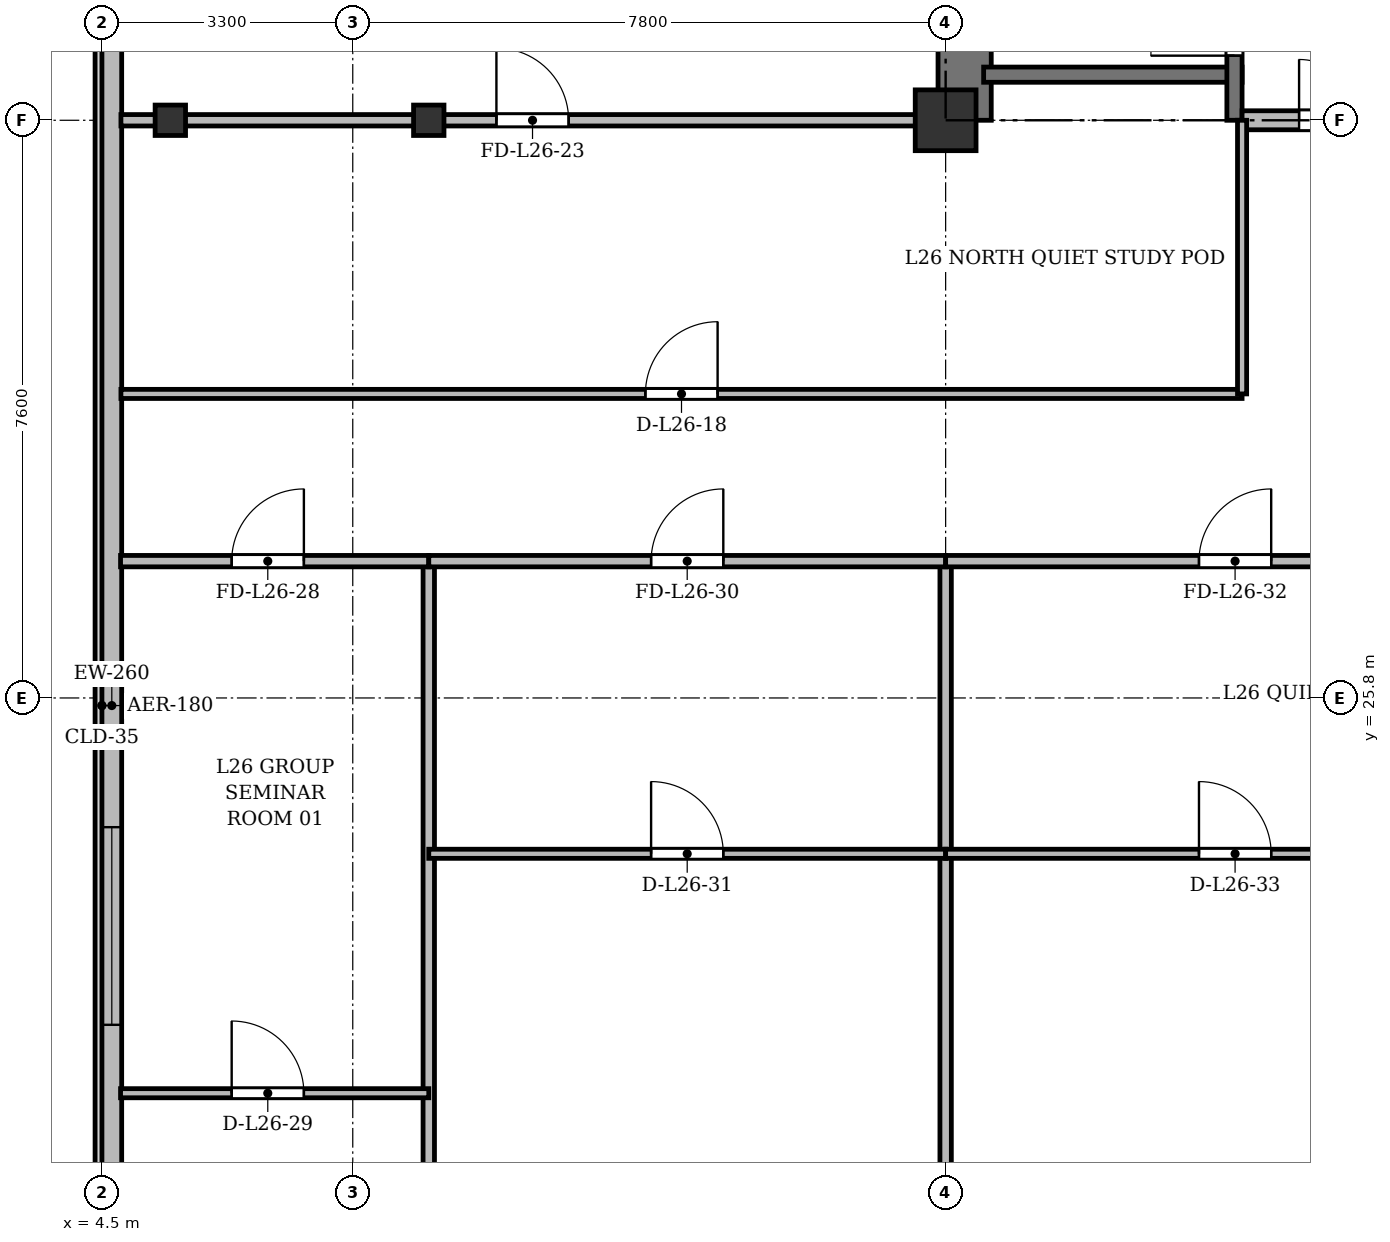
"""IFC4 building model, lengths in metres.
Left out: names, types, materials, properties, quantities, classifications, styles, units other than length and angle.
Written with IfcOpenShell. Run it as: python <this file> out.ifc"""

import sys

from ifc_helpers import new_model, si_unit, direction, frame, frame_2d, origin, origin_2d, place, context, subcontext, project, spatial, rectangle, i_section, extrude, source, transform, mapped, element, fill, save


model = new_model("IFC4")
c1 = context("Model", 3, precision=1e-05, world=origin(), true_north=direction((0.0, 1.0)))
c2 = subcontext(c1, "Body", "Model", "MODEL_VIEW")
j1 = project(units=[si_unit("LENGTHUNIT", "METRE"), si_unit("PLANEANGLEUNIT", "RADIAN")], contexts=[c1])
p1 = place(None, origin())
s1 = spatial("IfcSite", under=j1, at=p1, CompositionType="ELEMENT")
p2 = place(p1, origin())
s2 = spatial("IfcBuilding", under=s1, at=p2, CompositionType="ELEMENT")
p3 = place(p2, frame((0.0, 0.0, 103.3)))
s3 = spatial("IfcBuildingStorey", under=s2, at=p3, CompositionType="ELEMENT", Elevation=103.3)
m1 = source(origin(), c2, "Body", "SweptSolid", [
    extrude(i_section(OverallWidth=0.4, OverallDepth=0.4, WebThickness=0.022, FlangeThickness=0.035, at=origin_2d()), origin(), (0.0, 0.0, 1.0), 3.6),
])
for number, where, z_axis, x_axis in (
    (1, (5.4, 33.4, 0.0), (0.0, 0.0, 1.0), (1.0, 0.0, 0.0)),
    (2, (8.8, 33.4, 0.0), (0.0, 0.0, 1.0), (1.0, 0.0, 0.0)),
):
    element("IfcColumn", number, at=place(p3, frame(where, z_axis=z_axis, x_axis=x_axis)), inside=s3, PredefinedType="COLUMN", context=c2, shape_type="MappedRepresentation", body=[
        mapped(m1, transform((0.0, 0.0, 0.0), x_axis=(1.0, 0.0, 0.0), y_axis=(0.0, 1.0, 0.0), z_axis=(0.0, 0.0, 1.0), scale=1.0)),
    ])
m2 = source(origin(), c2, "Body", "SweptSolid", [
    extrude(rectangle(XDim=0.8, YDim=0.8, at=origin_2d()), origin(), (0.0, 0.0, 1.0), 3.6),
])
p4 = place(p3, frame((15.6, 33.4, 0.0), z_axis=(0.0, 0.0, 1.0), x_axis=(1.0, 0.0, 0.0)))
e3 = element("IfcColumn", 3, at=p4, inside=s3, PredefinedType="COLUMN", context=c2, shape_type="MappedRepresentation", body=[
    mapped(m2, transform((0.0, 0.0, 0.0), x_axis=(1.0, 0.0, 0.0), y_axis=(0.0, 1.0, 0.0), z_axis=(0.0, 0.0, 1.0), scale=1.0)),
])
p5 = place(p3, frame((4.63, 5.9, 0.0), z_axis=(0.0, 0.0, 1.0), x_axis=(0.0, 1.0, 0.0)))
e4 = element("IfcWall", 4, at=p5, inside=s3, PredefinedType="SOLIDWALL", context=c2, shape_type="SweptSolid", body=[
    extrude(rectangle(XDim=39.6, YDim=0.26, at=frame_2d((19.8, 0.0))), origin(), (0.0, 0.0, 1.0), 3.34),
])
p6 = place(p5, frame((1.45, 0.0, 0.92)))
e5 = element("IfcOpeningElement", 5, at=p6, cuts=e4, PredefinedType="OPENING", context=c2, shape_type="SweptSolid", body=[
    extrude(rectangle(XDim=1.2, YDim=1.65, at=frame_2d((0.6, 0.825))), frame((0.0, 0.14, 0.0), z_axis=(0.0, -1.0, 0.0), x_axis=(1.0, 0.0, 0.0)), (0.0, 0.0, 1.0), 0.28),
])
p7 = place(p5, frame((4.2, 0.0, 0.92)))
e6 = element("IfcOpeningElement", 6, at=p7, cuts=e4, PredefinedType="OPENING", context=c2, shape_type="SweptSolid", body=[
    extrude(rectangle(XDim=2.6, YDim=1.9, at=frame_2d((1.3, 0.95))), frame((0.0, 0.14, 0.0), z_axis=(0.0, -1.0, 0.0), x_axis=(1.0, 0.0, 0.0)), (0.0, 0.0, 1.0), 0.28),
])
p8 = place(p5, frame((8.4, 0.0, 0.92)))
e7 = element("IfcOpeningElement", 7, at=p8, cuts=e4, PredefinedType="OPENING", context=c2, shape_type="SweptSolid", body=[
    extrude(rectangle(XDim=2.6, YDim=1.9, at=frame_2d((1.3, 0.95))), frame((0.0, 0.14, 0.0), z_axis=(0.0, -1.0, 0.0), x_axis=(1.0, 0.0, 0.0)), (0.0, 0.0, 1.0), 0.28),
])
p9 = place(p5, frame((15.6, 0.0, 0.92)))
e8 = element("IfcOpeningElement", 8, at=p9, cuts=e4, PredefinedType="OPENING", context=c2, shape_type="SweptSolid", body=[
    extrude(rectangle(XDim=2.6, YDim=1.9, at=frame_2d((1.3, 0.95))), frame((0.0, 0.14, 0.0), z_axis=(0.0, -1.0, 0.0), x_axis=(1.0, 0.0, 0.0)), (0.0, 0.0, 1.0), 0.28),
])
p10 = place(p5, frame((29.6, 0.0, 0.92)))
e9 = element("IfcOpeningElement", 9, at=p10, cuts=e4, PredefinedType="OPENING", context=c2, shape_type="SweptSolid", body=[
    extrude(rectangle(XDim=2.6, YDim=1.9, at=frame_2d((1.3, 0.95))), frame((0.0, 0.14, 0.0), z_axis=(0.0, -1.0, 0.0), x_axis=(1.0, 0.0, 0.0)), (0.0, 0.0, 1.0), 0.28),
])
p11 = place(p5, frame((33.9, 0.0, 0.92)))
e10 = element("IfcOpeningElement", 10, at=p11, cuts=e4, PredefinedType="OPENING", context=c2, shape_type="SweptSolid", body=[
    extrude(rectangle(XDim=1.2, YDim=1.65, at=frame_2d((0.6, 0.825))), frame((0.0, 0.14, 0.0), z_axis=(0.0, -1.0, 0.0), x_axis=(1.0, 0.0, 0.0)), (0.0, 0.0, 1.0), 0.28),
])
p12 = place(p5, frame((37.25, 0.0, 0.92)))
e11 = element("IfcOpeningElement", 11, at=p12, cuts=e4, PredefinedType="OPENING", context=c2, shape_type="SweptSolid", body=[
    extrude(rectangle(XDim=1.2, YDim=1.65, at=frame_2d((0.6, 0.825))), frame((0.0, 0.14, 0.0), z_axis=(0.0, -1.0, 0.0), x_axis=(1.0, 0.0, 0.0)), (0.0, 0.0, 1.0), 0.28),
])
p13 = place(p3, frame((15.85, 33.4, 0.0), z_axis=(0.0, 0.0, 1.0), x_axis=(0.0, 1.0, 0.0)))
e12 = element("IfcWall", 12, at=p13, inside=s3, PredefinedType="SHEAR", context=c2, shape_type="SweptSolid", body=[
    extrude(rectangle(XDim=11.7, YDim=0.7, at=frame_2d((5.85, 0.0))), origin(), (0.0, 0.0, 1.0), 3.34),
])
p14 = place(p3, frame((16.1, 34.0, 0.0), z_axis=(0.0, 0.0, 1.0), x_axis=(1.0, 0.0, 0.0)))
e13 = element("IfcWall", 13, at=p14, inside=s3, PredefinedType="SHEAR", context=c2, shape_type="SweptSolid", body=[
    extrude(rectangle(XDim=3.4, YDim=0.2, at=frame_2d((1.7, 0.0))), origin(), (0.0, 0.0, 1.0), 3.34),
])
p15 = place(p3, frame((19.4, 33.4, 0.0), z_axis=(0.0, 0.0, 1.0), x_axis=(0.0, 1.0, 0.0)))
e14 = element("IfcWall", 14, at=p15, inside=s3, PredefinedType="SHEAR", context=c2, shape_type="SweptSolid", body=[
    extrude(rectangle(XDim=11.1, YDim=0.2, at=frame_2d((5.55, 0.0))), origin(), (0.0, 0.0, 1.0), 3.34),
])
p16 = place(p15, frame((0.85, 0.0, 0.0)))
e15 = element("IfcOpeningElement", 15, at=p16, cuts=e14, PredefinedType="OPENING", context=c2, shape_type="SweptSolid", body=[
    extrude(rectangle(XDim=1.1, YDim=2.15, at=frame_2d((0.55, 1.075))), frame((0.0, 0.11, 0.0), z_axis=(0.0, -1.0, 0.0), x_axis=(1.0, 0.0, 0.0)), (0.0, 0.0, 1.0), 0.22),
])
p17 = place(p3, frame((19.5, 33.4, 0.0), z_axis=(0.0, 0.0, 1.0), x_axis=(1.0, 0.0, 0.0)))
e16 = element("IfcWall", 16, at=p17, inside=s3, PredefinedType="PARTITIONING", context=c2, shape_type="SweptSolid", body=[
    extrude(rectangle(XDim=6.8, YDim=0.25, at=frame_2d((3.4, 0.0))), origin(), (0.0, 0.0, 1.0), 2.752),
])
p18 = place(p17, frame((0.75, 0.0, 0.0)))
e17 = element("IfcOpeningElement", 17, at=p18, cuts=e16, PredefinedType="OPENING", context=c2, shape_type="SweptSolid", body=[
    extrude(rectangle(XDim=1.6, YDim=2.2, at=frame_2d((0.8, 1.1))), frame((0.0, 0.135, 0.0), z_axis=(0.0, -1.0, 0.0), x_axis=(1.0, 0.0, 0.0)), (0.0, 0.0, 1.0), 0.27),
])
p19 = place(p3, frame((4.75, 29.8, 0.0), z_axis=(0.0, 0.0, 1.0), x_axis=(1.0, 0.0, 0.0)))
e18 = element("IfcWall", 18, at=p19, inside=s3, PredefinedType="PARTITIONING", context=c2, shape_type="SweptSolid", body=[
    extrude(rectangle(XDim=14.75, YDim=0.12, at=frame_2d((7.375, 0.0))), origin(), (0.0, 0.0, 1.0), 2.84),
])
p20 = place(p19, frame((6.9, 0.0, 0.0)))
e19 = element("IfcOpeningElement", 19, at=p20, cuts=e18, PredefinedType="OPENING", context=c2, shape_type="SweptSolid", body=[
    extrude(rectangle(XDim=0.95, YDim=2.15, at=frame_2d((0.475, 1.075))), frame((0.0, 0.07, 0.0), z_axis=(0.0, -1.0, 0.0), x_axis=(1.0, 0.0, 0.0)), (0.0, 0.0, 1.0), 0.14),
])
p21 = place(p3, frame((19.5, 29.8, 0.0), z_axis=(0.0, 0.0, 1.0), x_axis=(0.0, 1.0, 0.0)))
e20 = element("IfcWall", 20, at=p21, inside=s3, PredefinedType="PARTITIONING", context=c2, shape_type="SweptSolid", body=[
    extrude(rectangle(XDim=3.6, YDim=0.12, at=frame_2d((1.8, 0.0))), origin(), (0.0, 0.0, 1.0), 2.752),
])
p22 = place(p3, frame((4.75, 33.4, 0.0), z_axis=(0.0, 0.0, 1.0), x_axis=(1.0, 0.0, 0.0)))
e21 = element("IfcWall", 21, at=p22, inside=s3, PredefinedType="PARTITIONING", context=c2, shape_type="SweptSolid", body=[
    extrude(rectangle(XDim=10.85, YDim=0.15, at=frame_2d((5.425, 0.0))), origin(), (0.0, 0.0, 1.0), 2.752),
])
p23 = place(p22, frame((4.94, 0.0, 0.0)))
e22 = element("IfcOpeningElement", 22, at=p23, cuts=e21, PredefinedType="OPENING", context=c2, shape_type="SweptSolid", body=[
    extrude(rectangle(XDim=0.95, YDim=2.15, at=frame_2d((0.475, 1.075))), frame((0.0, 0.085, 0.0), z_axis=(0.0, -1.0, 0.0), x_axis=(1.0, 0.0, 0.0)), (0.0, 0.0, 1.0), 0.17),
])
for number, where, z_axis, x_axis in (
    (23, (8.8, 3.145, 0.0), (0.0, 0.0, 1.0), (0.0, 1.0, 0.0)),
    (24, (15.6, 3.145, 0.0), (0.0, 0.0, 1.0), (0.0, 1.0, 0.0)),
):
    element("IfcWall", number, at=place(p3, frame(where, z_axis=z_axis, x_axis=x_axis)), inside=s3, PredefinedType="PARTITIONING", context=c2, shape_type="SweptSolid", body=[
        extrude(rectangle(XDim=24.455, YDim=0.15, at=frame_2d((12.228, 0.0))), origin(), (0.0, 0.0, 1.0), 2.84),
    ])
p24 = place(p3, frame((4.745, 27.6, 0.0), z_axis=(0.0, 0.0, 1.0), x_axis=(1.0, 0.0, 0.0)))
e25 = element("IfcWall", 25, at=p24, inside=s3, PredefinedType="PARTITIONING", context=c2, shape_type="SweptSolid", body=[
    extrude(rectangle(XDim=4.055, YDim=0.15, at=frame_2d((2.027, 0.0))), origin(), (0.0, 0.0, 1.0), 2.84),
])
p25 = place(p24, frame((1.462, 0.0, 0.0)))
e26 = element("IfcOpeningElement", 26, at=p25, cuts=e25, PredefinedType="OPENING", context=c2, shape_type="SweptSolid", body=[
    extrude(rectangle(XDim=0.95, YDim=2.15, at=frame_2d((0.475, 1.075))), frame((0.0, 0.085, 0.0), z_axis=(0.0, -1.0, 0.0), x_axis=(1.0, 0.0, 0.0)), (0.0, 0.0, 1.0), 0.17),
])
p26 = place(p3, frame((4.745, 20.6, 0.0), z_axis=(0.0, 0.0, 1.0), x_axis=(1.0, 0.0, 0.0)))
e27 = element("IfcWall", 27, at=p26, inside=s3, PredefinedType="PARTITIONING", context=c2, shape_type="SweptSolid", body=[
    extrude(rectangle(XDim=4.055, YDim=0.12, at=frame_2d((2.027, 0.0))), origin(), (0.0, 0.0, 1.0), 2.84),
])
p27 = place(p26, frame((1.462, 0.0, 0.0)))
e28 = element("IfcOpeningElement", 28, at=p27, cuts=e27, PredefinedType="OPENING", context=c2, shape_type="SweptSolid", body=[
    extrude(rectangle(XDim=0.95, YDim=2.15, at=frame_2d((0.475, 1.075))), frame((0.0, 0.07, 0.0), z_axis=(0.0, -1.0, 0.0), x_axis=(1.0, 0.0, 0.0)), (0.0, 0.0, 1.0), 0.14),
])
p28 = place(p3, frame((8.8, 27.6, 0.0), z_axis=(0.0, 0.0, 1.0), x_axis=(1.0, 0.0, 0.0)))
e29 = element("IfcWall", 29, at=p28, inside=s3, PredefinedType="PARTITIONING", context=c2, shape_type="SweptSolid", body=[
    extrude(rectangle(XDim=6.8, YDim=0.15, at=frame_2d((3.4, 0.0))), origin(), (0.0, 0.0, 1.0), 2.84),
])
p29 = place(p28, frame((2.925, 0.0, 0.0)))
e30 = element("IfcOpeningElement", 30, at=p29, cuts=e29, PredefinedType="OPENING", context=c2, shape_type="SweptSolid", body=[
    extrude(rectangle(XDim=0.95, YDim=2.15, at=frame_2d((0.475, 1.075))), frame((0.0, 0.085, 0.0), z_axis=(0.0, -1.0, 0.0), x_axis=(1.0, 0.0, 0.0)), (0.0, 0.0, 1.0), 0.17),
])
p30 = place(p3, frame((8.8, 23.75, 0.0), z_axis=(0.0, 0.0, 1.0), x_axis=(1.0, 0.0, 0.0)))
e31 = element("IfcWall", 31, at=p30, inside=s3, PredefinedType="PARTITIONING", context=c2, shape_type="SweptSolid", body=[
    extrude(rectangle(XDim=6.8, YDim=0.12, at=frame_2d((3.4, 0.0))), origin(), (0.0, 0.0, 1.0), 2.84),
])
p31 = place(p30, frame((2.925, 0.0, 0.0)))
e32 = element("IfcOpeningElement", 32, at=p31, cuts=e31, PredefinedType="OPENING", context=c2, shape_type="SweptSolid", body=[
    extrude(rectangle(XDim=0.95, YDim=2.15, at=frame_2d((0.475, 1.075))), frame((0.0, 0.07, 0.0), z_axis=(0.0, -1.0, 0.0), x_axis=(1.0, 0.0, 0.0)), (0.0, 0.0, 1.0), 0.14),
])
p32 = place(p3, frame((15.6, 27.6, 0.0), z_axis=(0.0, 0.0, 1.0), x_axis=(1.0, 0.0, 0.0)))
e33 = element("IfcWall", 33, at=p32, inside=s3, PredefinedType="PARTITIONING", context=c2, shape_type="SweptSolid", body=[
    extrude(rectangle(XDim=7.8, YDim=0.15, at=frame_2d((3.9, 0.0))), origin(), (0.0, 0.0, 1.0), 2.84),
])
p33 = place(p32, frame((3.333, 0.0, 0.0)))
e34 = element("IfcOpeningElement", 34, at=p33, cuts=e33, PredefinedType="OPENING", context=c2, shape_type="SweptSolid", body=[
    extrude(rectangle(XDim=0.95, YDim=2.15, at=frame_2d((0.475, 1.075))), frame((0.0, 0.085, 0.0), z_axis=(0.0, -1.0, 0.0), x_axis=(1.0, 0.0, 0.0)), (0.0, 0.0, 1.0), 0.17),
])
p34 = place(p3, frame((15.6, 23.75, 0.0), z_axis=(0.0, 0.0, 1.0), x_axis=(1.0, 0.0, 0.0)))
e35 = element("IfcWall", 35, at=p34, inside=s3, PredefinedType="PARTITIONING", context=c2, shape_type="SweptSolid", body=[
    extrude(rectangle(XDim=7.8, YDim=0.12, at=frame_2d((3.9, 0.0))), origin(), (0.0, 0.0, 1.0), 2.84),
])
p35 = place(p34, frame((3.333, 0.0, 0.0)))
e36 = element("IfcOpeningElement", 36, at=p35, cuts=e35, PredefinedType="OPENING", context=c2, shape_type="SweptSolid", body=[
    extrude(rectangle(XDim=0.95, YDim=2.15, at=frame_2d((0.475, 1.075))), frame((0.0, 0.07, 0.0), z_axis=(0.0, -1.0, 0.0), x_axis=(1.0, 0.0, 0.0)), (0.0, 0.0, 1.0), 0.14),
])
m3 = source(origin(), c2, "Body", "SweptSolid", [
    extrude(rectangle(XDim=2.6, YDim=1.9, at=frame_2d((1.3, 0.95))), frame((0.0, 0.03, 0.0), z_axis=(0.0, -1.0, 0.0), x_axis=(1.0, 0.0, 0.0)), (0.0, 0.0, 1.0), 0.06),
])
p36 = place(p9, origin())
e37 = element("IfcWindow", 37, at=p36, inside=s3, PartitioningType="SINGLE_PANEL", PredefinedType="WINDOW", context=c2, shape_type="MappedRepresentation", body=[
    mapped(m3, transform((0.0, 0.0, 0.0), x_axis=(1.0, 0.0, 0.0), y_axis=(0.0, 1.0, 0.0), z_axis=(0.0, 0.0, 1.0), scale=1.0)),
])
fill(e8, e37)
m4 = source(origin(), c2, "Body", "SweptSolid", [
    extrude(rectangle(XDim=1.1, YDim=2.15, at=frame_2d((0.55, 1.075))), frame((0.0, 0.025, 0.0), z_axis=(0.0, -1.0, 0.0), x_axis=(1.0, 0.0, 0.0)), (0.0, 0.0, 1.0), 0.05),
])
p37 = place(p16, origin())
e38 = element("IfcDoor", 38, at=p37, inside=s3, OperationType="SINGLE_SWING_LEFT", PredefinedType="DOOR", context=c2, shape_type="MappedRepresentation", body=[
    mapped(m4, transform((0.0, 0.0, 0.0), x_axis=(1.0, 0.0, 0.0), y_axis=(0.0, 1.0, 0.0), z_axis=(0.0, 0.0, 1.0), scale=1.0)),
])
fill(e15, e38)
m5 = source(origin(), c2, "Body", "SweptSolid", [
    extrude(rectangle(XDim=1.6, YDim=2.2, at=frame_2d((0.8, 1.1))), frame((0.0, 0.025, 0.0), z_axis=(0.0, -1.0, 0.0), x_axis=(1.0, 0.0, 0.0)), (0.0, 0.0, 1.0), 0.05),
])
p38 = place(p18, origin())
e39 = element("IfcDoor", 39, at=p38, inside=s3, OperationType="DOUBLE_DOOR_SINGLE_SWING", PredefinedType="DOOR", context=c2, shape_type="MappedRepresentation", body=[
    mapped(m5, transform((0.0, 0.0, 0.0), x_axis=(1.0, 0.0, 0.0), y_axis=(0.0, 1.0, 0.0), z_axis=(0.0, 0.0, 1.0), scale=1.0)),
])
fill(e17, e39)
m6 = source(origin(), c2, "Body", "SweptSolid", [
    extrude(rectangle(XDim=0.95, YDim=2.15, at=frame_2d((0.475, 1.075))), frame((0.0, 0.025, 0.0), z_axis=(0.0, -1.0, 0.0), x_axis=(1.0, 0.0, 0.0)), (0.0, 0.0, 1.0), 0.05),
])
p39 = place(p20, origin())
e40 = element("IfcDoor", 40, at=p39, inside=s3, OperationType="SINGLE_SWING_RIGHT", PredefinedType="DOOR", context=c2, shape_type="MappedRepresentation", body=[
    mapped(m6, transform((0.0, 0.0, 0.0), x_axis=(1.0, 0.0, 0.0), y_axis=(0.0, 1.0, 0.0), z_axis=(0.0, 0.0, 1.0), scale=1.0)),
])
fill(e19, e40)
p40 = place(p23, origin())
e41 = element("IfcDoor", 41, at=p40, inside=s3, OperationType="SINGLE_SWING_LEFT", PredefinedType="DOOR", context=c2, shape_type="MappedRepresentation", body=[
    mapped(m6, transform((0.0, 0.0, 0.0), x_axis=(1.0, 0.0, 0.0), y_axis=(0.0, 1.0, 0.0), z_axis=(0.0, 0.0, 1.0), scale=1.0)),
])
fill(e22, e41)
p41 = place(p25, origin())
e42 = element("IfcDoor", 42, at=p41, inside=s3, OperationType="SINGLE_SWING_RIGHT", PredefinedType="DOOR", context=c2, shape_type="MappedRepresentation", body=[
    mapped(m6, transform((0.0, 0.0, 0.0), x_axis=(1.0, 0.0, 0.0), y_axis=(0.0, 1.0, 0.0), z_axis=(0.0, 0.0, 1.0), scale=1.0)),
])
fill(e26, e42)
p42 = place(p27, origin())
e43 = element("IfcDoor", 43, at=p42, inside=s3, OperationType="SINGLE_SWING_LEFT", PredefinedType="DOOR", context=c2, shape_type="MappedRepresentation", body=[
    mapped(m6, transform((0.0, 0.0, 0.0), x_axis=(1.0, 0.0, 0.0), y_axis=(0.0, 1.0, 0.0), z_axis=(0.0, 0.0, 1.0), scale=1.0)),
])
fill(e28, e43)
p43 = place(p29, origin())
e44 = element("IfcDoor", 44, at=p43, inside=s3, OperationType="SINGLE_SWING_RIGHT", PredefinedType="DOOR", context=c2, shape_type="MappedRepresentation", body=[
    mapped(m6, transform((0.0, 0.0, 0.0), x_axis=(1.0, 0.0, 0.0), y_axis=(0.0, 1.0, 0.0), z_axis=(0.0, 0.0, 1.0), scale=1.0)),
])
fill(e30, e44)
p44 = place(p31, origin())
e45 = element("IfcDoor", 45, at=p44, inside=s3, OperationType="SINGLE_SWING_LEFT", PredefinedType="DOOR", context=c2, shape_type="MappedRepresentation", body=[
    mapped(m6, transform((0.0, 0.0, 0.0), x_axis=(1.0, 0.0, 0.0), y_axis=(0.0, 1.0, 0.0), z_axis=(0.0, 0.0, 1.0), scale=1.0)),
])
fill(e32, e45)
p45 = place(p33, origin())
e46 = element("IfcDoor", 46, at=p45, inside=s3, OperationType="SINGLE_SWING_RIGHT", PredefinedType="DOOR", context=c2, shape_type="MappedRepresentation", body=[
    mapped(m6, transform((0.0, 0.0, 0.0), x_axis=(1.0, 0.0, 0.0), y_axis=(0.0, 1.0, 0.0), z_axis=(0.0, 0.0, 1.0), scale=1.0)),
])
fill(e34, e46)
p46 = place(p35, origin())
e47 = element("IfcDoor", 47, at=p46, inside=s3, OperationType="SINGLE_SWING_LEFT", PredefinedType="DOOR", context=c2, shape_type="MappedRepresentation", body=[
    mapped(m6, transform((0.0, 0.0, 0.0), x_axis=(1.0, 0.0, 0.0), y_axis=(0.0, 1.0, 0.0), z_axis=(0.0, 0.0, 1.0), scale=1.0)),
])
fill(e36, e47)
save(model, sys.argv[1])
